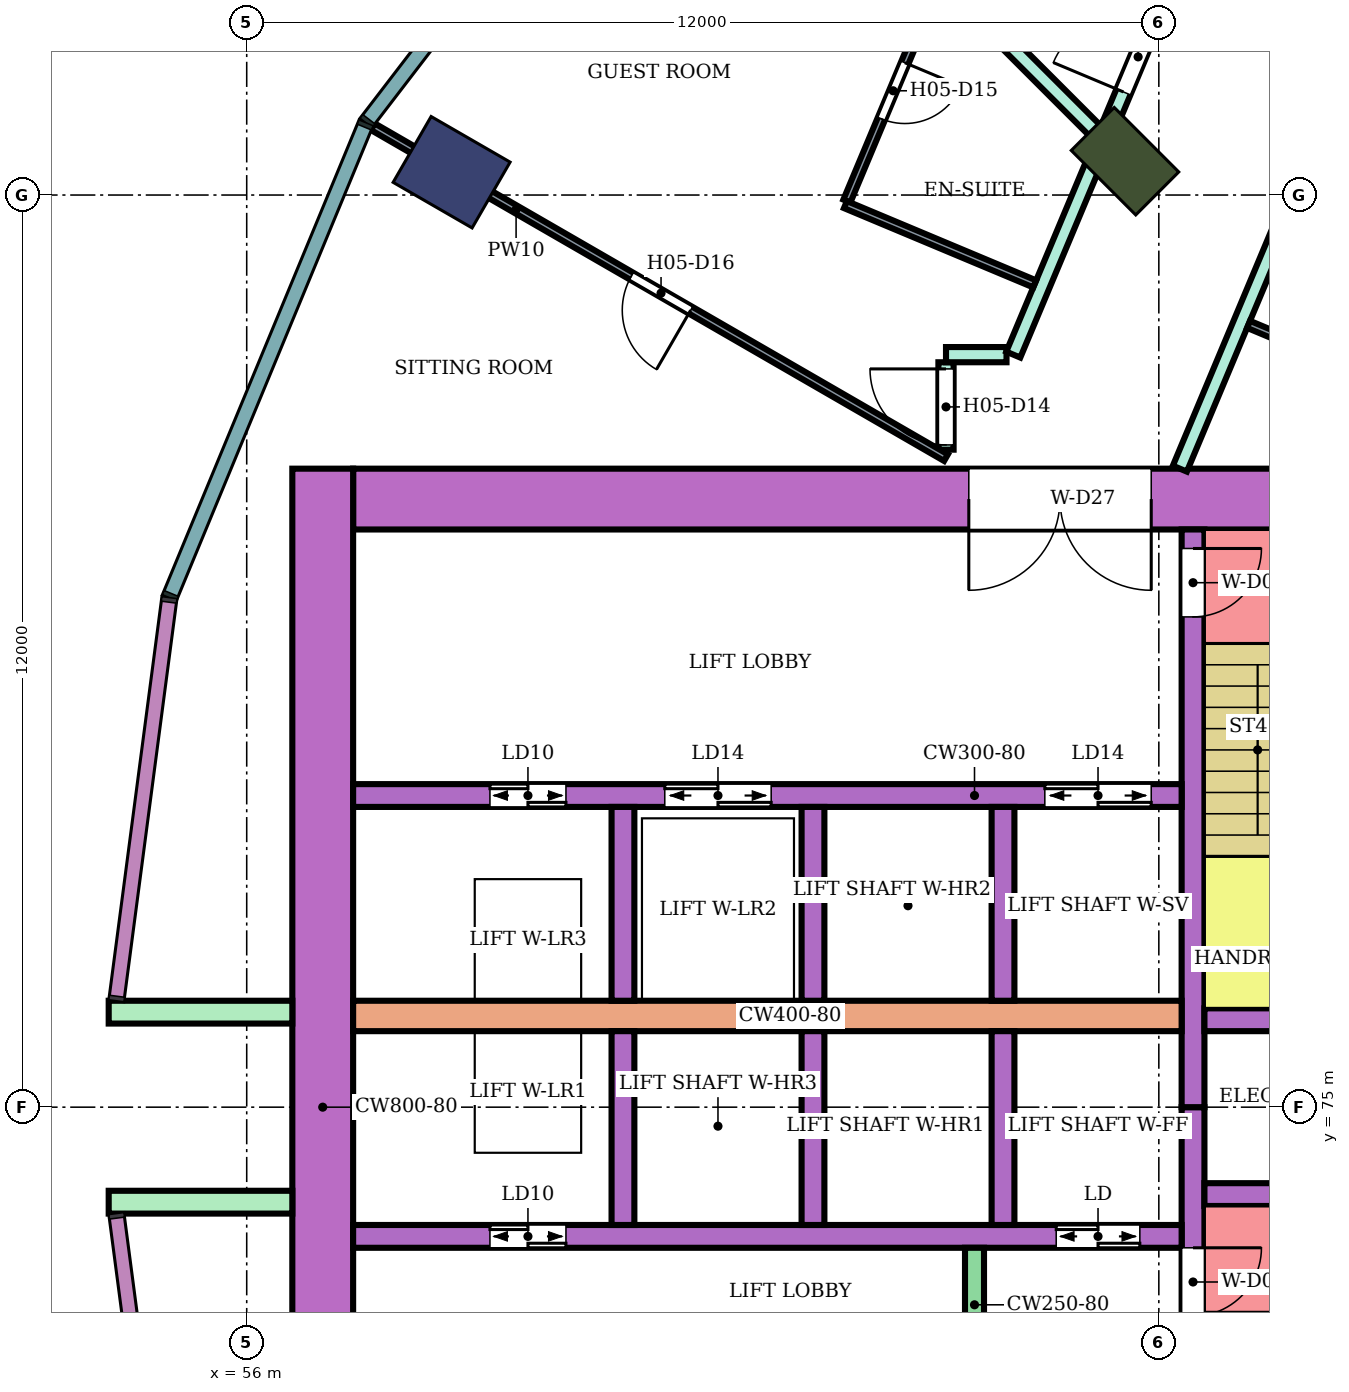
"""IFC4 building model, lengths in metres.
Left out: names, types, materials, properties, quantities, classifications, styles, units other than length and angle.
Written with IfcOpenShell. Run it as: python <this file> out.ifc"""

import sys

from ifc_helpers import new_model, si_unit, direction, frame, frame_2d, origin, origin_2d, place, context, subcontext, project, spatial, rectangle, extrude, element, fill, save


model = new_model("IFC4")
c1 = context("Model", 3, precision=1e-05, world=origin(), true_north=direction((0.0, 1.0)))
c2 = subcontext(c1, "Body", "Model", "MODEL_VIEW")
j1 = project(units=[si_unit("LENGTHUNIT", "METRE"), si_unit("PLANEANGLEUNIT", "RADIAN")], contexts=[c1])
p1 = place(None, origin())
s1 = spatial("IfcSite", under=j1, at=p1, CompositionType="ELEMENT")
p2 = place(p1, origin())
s2 = spatial("IfcBuilding", under=s1, at=p2, CompositionType="ELEMENT")
p3 = place(p2, frame((0.0, 0.0, 86.2)))
s3 = spatial("IfcBuildingStorey", under=s2, at=p3, CompositionType="ELEMENT", Elevation=86.2)
p4 = place(p3, frame((58.696, 87.3, 0.0), z_axis=(0.0, 0.0, 1.0), x_axis=(-0.866025403784, 0.5, 0.0)))
e1 = element("IfcColumn", 1, at=p4, inside=s3, PredefinedType="COLUMN", context=c2, shape_type="SweptSolid", body=[
    extrude(rectangle(XDim=1.2, YDim=1.0, at=origin_2d()), origin(), (0.0, 0.0, 1.0), 3.8),
])
p5 = place(p3, frame((67.555, 87.445, 0.0), z_axis=(0.0, 0.0, 1.0), x_axis=(-0.707106781187, 0.707106781187, 0.0)))
e2 = element("IfcColumn", 2, at=p5, inside=s3, PredefinedType="COLUMN", context=c2, shape_type="SweptSolid", body=[
    extrude(rectangle(XDim=1.2, YDim=0.8, at=origin_2d()), origin(), (0.0, 0.0, 1.0), 3.8),
])
p6 = place(p3, frame((72.1, 83.0, 0.0), z_axis=(0.0, 0.0, 1.0), x_axis=(-1.0, 0.0, 0.0)))
e3 = element("IfcWall", 3, at=p6, inside=s3, PredefinedType="SHEAR", context=c2, shape_type="SweptSolid", body=[
    extrude(rectangle(XDim=14.7, YDim=0.8, at=frame_2d((7.35, 0.0))), origin(), (0.0, 0.0, 1.0), 3.48),
])
p7 = place(p6, frame((4.2, 0.0, 0.0)))
e4 = element("IfcOpeningElement", 4, at=p7, cuts=e3, PredefinedType="OPENING", context=c2, shape_type="SweptSolid", body=[
    extrude(rectangle(XDim=2.4, YDim=2.4, at=frame_2d((1.2, 1.2))), frame((0.0, 0.41, 0.0), z_axis=(0.0, -1.0, 0.0), x_axis=(1.0, 0.0, 0.0)), (0.0, 0.0, 1.0), 0.82),
])
p8 = place(p3, frame((57.0, 83.4, 0.0), z_axis=(0.0, 0.0, 1.0), x_axis=(0.0, -1.0, 0.0)))
e5 = element("IfcWall", 5, at=p8, inside=s3, PredefinedType="SHEAR", context=c2, shape_type="SweptSolid", body=[
    extrude(rectangle(XDim=16.8, YDim=0.8, at=frame_2d((8.4, 0.0))), origin(), (0.0, 0.0, 1.0), 3.48),
])
p9 = place(p3, frame((68.45, 75.0, 0.0), z_axis=(0.0, 0.0, 1.0), x_axis=(0.0, -1.0, 0.0)))
e6 = element("IfcWall", 6, at=p9, inside=s3, PredefinedType="SHEAR", context=c2, shape_type="SweptSolid", body=[
    extrude(rectangle(XDim=7.6, YDim=0.3, at=frame_2d((3.8, 0.0))), origin(), (0.0, 0.0, 1.0), 3.48),
])
p10 = place(p9, frame((1.85, 0.0, 0.0)))
e7 = element("IfcOpeningElement", 7, at=p10, cuts=e6, PredefinedType="OPENING", context=c2, shape_type="SweptSolid", body=[
    extrude(rectangle(XDim=0.9, YDim=2.1, at=frame_2d((0.45, 1.05))), frame((0.0, 0.16, 0.0), z_axis=(0.0, -1.0, 0.0), x_axis=(1.0, 0.0, 0.0)), (0.0, 0.0, 1.0), 0.32),
])
p11 = place(p3, frame((68.45, 82.6, 0.0), z_axis=(0.0, 0.0, 1.0), x_axis=(0.0, -1.0, 0.0)))
e8 = element("IfcWall", 8, at=p11, inside=s3, PredefinedType="SHEAR", context=c2, shape_type="SweptSolid", body=[
    extrude(rectangle(XDim=7.6, YDim=0.3, at=frame_2d((3.8, 0.0))), origin(), (0.0, 0.0, 1.0), 3.48),
])
p12 = place(p11, frame((0.25, 0.0, 0.0)))
e9 = element("IfcOpeningElement", 9, at=p12, cuts=e8, PredefinedType="OPENING", context=c2, shape_type="SweptSolid", body=[
    extrude(rectangle(XDim=0.9, YDim=2.1, at=frame_2d((0.45, 1.05))), frame((0.0, 0.16, 0.0), z_axis=(0.0, -1.0, 0.0), x_axis=(1.0, 0.0, 0.0)), (0.0, 0.0, 1.0), 0.32),
])
p13 = place(p3, frame((71.65, 73.85, 0.0), z_axis=(0.0, 0.0, 1.0), x_axis=(-1.0, 0.0, 0.0)))
e10 = element("IfcWall", 10, at=p13, inside=s3, PredefinedType="SHEAR", context=c2, shape_type="SweptSolid", body=[
    extrude(rectangle(XDim=3.05, YDim=0.3, at=frame_2d((1.525, 0.0))), origin(), (0.0, 0.0, 1.0), 3.48),
])
p14 = place(p13, frame((1.1, 0.0, 0.0)))
e11 = element("IfcOpeningElement", 11, at=p14, cuts=e10, PredefinedType="OPENING", context=c2, shape_type="SweptSolid", body=[
    extrude(rectangle(XDim=0.7, YDim=2.0, at=frame_2d((0.35, 1.0))), frame((0.0, 0.16, 0.0), z_axis=(0.0, -1.0, 0.0), x_axis=(1.0, 0.0, 0.0)), (0.0, 0.0, 1.0), 0.32),
])
p15 = place(p3, frame((71.65, 76.15, 0.0), z_axis=(0.0, 0.0, 1.0), x_axis=(-1.0, 0.0, 0.0)))
e12 = element("IfcWall", 12, at=p15, inside=s3, PredefinedType="SHEAR", context=c2, shape_type="SweptSolid", body=[
    extrude(rectangle(XDim=3.05, YDim=0.3, at=frame_2d((1.525, 0.0))), origin(), (0.0, 0.0, 1.0), 3.48),
])
p16 = place(p3, frame((68.3, 73.3, 0.0), z_axis=(0.0, 0.0, 1.0), x_axis=(-1.0, 0.0, 0.0)))
e13 = element("IfcWall", 13, at=p16, inside=s3, PredefinedType="SHEAR", context=c2, shape_type="SweptSolid", body=[
    extrude(rectangle(XDim=10.9, YDim=0.3, at=frame_2d((5.45, 0.0))), origin(), (0.0, 0.0, 1.0), 3.48),
])
p17 = place(p16, frame((0.55, 0.0, 0.0)))
e14 = element("IfcOpeningElement", 14, at=p17, cuts=e13, PredefinedType="OPENING", context=c2, shape_type="SweptSolid", body=[
    extrude(rectangle(XDim=1.1, YDim=2.1, at=frame_2d((0.55, 1.05))), frame((0.0, 0.16, 0.0), z_axis=(0.0, -1.0, 0.0), x_axis=(1.0, 0.0, 0.0)), (0.0, 0.0, 1.0), 0.32),
])
p18 = place(p16, frame((8.1, 0.0, 0.0)))
e15 = element("IfcOpeningElement", 15, at=p18, cuts=e13, PredefinedType="OPENING", context=c2, shape_type="SweptSolid", body=[
    extrude(rectangle(XDim=1.0, YDim=2.1, at=frame_2d((0.5, 1.05))), frame((0.0, 0.16, 0.0), z_axis=(0.0, -1.0, 0.0), x_axis=(1.0, 0.0, 0.0)), (0.0, 0.0, 1.0), 0.32),
])
p19 = place(p3, frame((68.3, 76.2, 0.0), z_axis=(0.0, 0.0, 1.0), x_axis=(-1.0, 0.0, 0.0)))
e16 = element("IfcWall", 16, at=p19, inside=s3, PredefinedType="SHEAR", context=c2, shape_type="SweptSolid", body=[
    extrude(rectangle(XDim=10.9, YDim=0.4, at=frame_2d((5.45, 0.0))), origin(), (0.0, 0.0, 1.0), 3.48),
])
p20 = place(p3, frame((68.3, 79.1, 0.0), z_axis=(0.0, 0.0, 1.0), x_axis=(-1.0, 0.0, 0.0)))
e17 = element("IfcWall", 17, at=p20, inside=s3, PredefinedType="SHEAR", context=c2, shape_type="SweptSolid", body=[
    extrude(rectangle(XDim=10.9, YDim=0.3, at=frame_2d((5.45, 0.0))), origin(), (0.0, 0.0, 1.0), 3.48),
])
p21 = place(p20, frame((0.4, 0.0, 0.0)))
e18 = element("IfcOpeningElement", 18, at=p21, cuts=e17, PredefinedType="OPENING", context=c2, shape_type="SweptSolid", body=[
    extrude(rectangle(XDim=1.4, YDim=2.1, at=frame_2d((0.7, 1.05))), frame((0.0, 0.16, 0.0), z_axis=(0.0, -1.0, 0.0), x_axis=(1.0, 0.0, 0.0)), (0.0, 0.0, 1.0), 0.32),
])
p22 = place(p20, frame((5.4, 0.0, 0.0)))
e19 = element("IfcOpeningElement", 19, at=p22, cuts=e17, PredefinedType="OPENING", context=c2, shape_type="SweptSolid", body=[
    extrude(rectangle(XDim=1.4, YDim=2.1, at=frame_2d((0.7, 1.05))), frame((0.0, 0.16, 0.0), z_axis=(0.0, -1.0, 0.0), x_axis=(1.0, 0.0, 0.0)), (0.0, 0.0, 1.0), 0.32),
])
p23 = place(p20, frame((8.1, 0.0, 0.0)))
e20 = element("IfcOpeningElement", 20, at=p23, cuts=e17, PredefinedType="OPENING", context=c2, shape_type="SweptSolid", body=[
    extrude(rectangle(XDim=1.0, YDim=2.1, at=frame_2d((0.5, 1.05))), frame((0.0, 0.16, 0.0), z_axis=(0.0, -1.0, 0.0), x_axis=(1.0, 0.0, 0.0)), (0.0, 0.0, 1.0), 0.32),
])
for number, where, z_axis, x_axis in (
    (21, (65.95, 76.0, 0.0), (0.0, 0.0, 1.0), (0.0, -1.0, 0.0)),
    (22, (63.45, 76.0, 0.0), (0.0, 0.0, 1.0), (0.0, -1.0, 0.0)),
    (23, (60.95, 76.0, 0.0), (0.0, 0.0, 1.0), (0.0, -1.0, 0.0)),
    (24, (65.95, 78.95, 0.0), (0.0, 0.0, 1.0), (0.0, -1.0, 0.0)),
    (25, (63.45, 78.95, 0.0), (0.0, 0.0, 1.0), (0.0, -1.0, 0.0)),
    (26, (60.95, 78.95, 0.0), (0.0, 0.0, 1.0), (0.0, -1.0, 0.0)),
):
    element("IfcWall", number, at=place(p3, frame(where, z_axis=z_axis, x_axis=x_axis)), inside=s3, PredefinedType="SHEAR", context=c2, shape_type="SweptSolid", body=[
        extrude(rectangle(XDim=2.55, YDim=0.3, at=frame_2d((1.275, 0.0))), origin(), (0.0, 0.0, 1.0), 3.48),
    ])
p24 = place(p3, frame((65.575, 73.15, 0.0), z_axis=(0.0, 0.0, 1.0), x_axis=(0.0, -1.0, 0.0)))
e27 = element("IfcWall", 27, at=p24, inside=s3, PredefinedType="SHEAR", context=c2, shape_type="SweptSolid", body=[
    extrude(rectangle(XDim=1.5, YDim=0.25, at=frame_2d((0.75, 0.0))), origin(), (0.0, 0.0, 1.0), 3.48),
])
for number, where, z_axis, x_axis in (
    (28, (56.6, 76.25, 0.0), (0.0, 0.0, 1.0), (-1.0, 0.0, 0.0)),
    (29, (56.6, 73.75, 0.0), (0.0, 0.0, 1.0), (-1.0, 0.0, 0.0)),
):
    element("IfcWall", number, at=place(p3, frame(where, z_axis=z_axis, x_axis=x_axis)), inside=s3, PredefinedType="NOTDEFINED", context=c2, shape_type="SweptSolid", body=[
        extrude(rectangle(XDim=2.416, YDim=0.3, at=frame_2d((1.208, 0.0))), origin(), (0.0, 0.0, 1.0), 3.8),
    ])
p25 = place(p3, frame((63.6, 91.409, 0.0), z_axis=(0.0, 0.0, 1.0), x_axis=(0.70693749829, -0.707276023566, 0.0)))
e30 = element("IfcWall", 30, at=p25, inside=s3, PredefinedType="PARTITIONING", context=c2, shape_type="SweptSolid", body=[
    extrude(rectangle(XDim=5.048, YDim=0.2, at=frame_2d((2.524, 0.0))), origin(), (0.0, 0.0, 1.0), 3.35),
])
p26 = place(p3, frame((65.2, 83.65, 0.0), z_axis=(0.0, 0.0, 1.0), x_axis=(0.0, 1.0, 0.0)))
e31 = element("IfcWall", 31, at=p26, inside=s3, PredefinedType="PARTITIONING", context=c2, shape_type="SweptSolid", body=[
    extrude(rectangle(XDim=1.15, YDim=0.2, at=frame_2d((0.575, 0.0))), origin(), (0.0, 0.0, 1.0), 3.35),
])
p27 = place(p26, frame((0.062, 0.0, 0.0)))
e32 = element("IfcOpeningElement", 32, at=p27, cuts=e31, PredefinedType="OPENING", context=c2, shape_type="SweptSolid", body=[
    extrude(rectangle(XDim=1.0, YDim=2.1, at=frame_2d((0.5, 1.05))), frame((0.0, 0.11, 0.0), z_axis=(0.0, -1.0, 0.0), x_axis=(1.0, 0.0, 0.0)), (0.0, 0.0, 1.0), 0.22),
])
p28 = place(p3, frame((65.2, 84.9, 0.0), z_axis=(0.0, 0.0, 1.0), x_axis=(1.0, 0.0, 0.0)))
e33 = element("IfcWall", 33, at=p28, inside=s3, PredefinedType="PARTITIONING", context=c2, shape_type="SweptSolid", body=[
    extrude(rectangle(XDim=0.796, YDim=0.2, at=frame_2d((0.398, 0.0))), origin(), (0.0, 0.0, 1.0), 3.35),
])
p29 = place(p3, frame((66.085, 84.9, 0.0), z_axis=(0.0, 0.0, 1.0), x_axis=(0.386676248006, 0.922215527536, 0.0)))
e34 = element("IfcWall", 34, at=p29, inside=s3, PredefinedType="PARTITIONING", context=c2, shape_type="SweptSolid", body=[
    extrude(rectangle(XDim=8.5, YDim=0.2, at=frame_2d((4.25, 0.0))), origin(), (0.0, 0.0, 1.0), 3.35),
])
p30 = place(p29, frame((3.748, 0.0, 0.0)))
e35 = element("IfcOpeningElement", 35, at=p30, cuts=e34, PredefinedType="OPENING", context=c2, shape_type="SweptSolid", body=[
    extrude(rectangle(XDim=1.0, YDim=2.1, at=frame_2d((0.5, 1.05))), frame((0.0, 0.11, 0.0), z_axis=(0.0, -1.0, 0.0), x_axis=(1.0, 0.0, 0.0)), (0.0, 0.0, 1.0), 0.22),
])
p31 = place(p3, frame((68.277, 83.4, 0.0), z_axis=(0.0, 0.0, 1.0), x_axis=(0.386454861164, 0.922308321703, 0.0)))
e36 = element("IfcWall", 36, at=p31, inside=s3, PredefinedType="PARTITIONING", context=c2, shape_type="SweptSolid", body=[
    extrude(rectangle(XDim=7.762, YDim=0.2, at=frame_2d((3.881, 0.0))), origin(), (0.0, 0.0, 1.0), 3.35),
])
p32 = place(p31, frame((5.351, 0.0, 0.0)))
e37 = element("IfcOpeningElement", 37, at=p32, cuts=e36, PredefinedType="OPENING", context=c2, shape_type="SweptSolid", body=[
    extrude(rectangle(XDim=1.0, YDim=2.1, at=frame_2d((0.5, 1.05))), frame((0.0, 0.11, 0.0), z_axis=(0.0, -1.0, 0.0), x_axis=(1.0, 0.0, 0.0)), (0.0, 0.0, 1.0), 0.22),
])
p33 = place(p3, frame((57.659, 87.899, 0.0), z_axis=(0.0, 0.0, 1.0), x_axis=(0.86602264145, -0.500004784474, 0.0)))
e38 = element("IfcWall", 38, at=p33, inside=s3, PredefinedType="PARTITIONING", context=c2, shape_type="SweptSolid", body=[
    extrude(rectangle(XDim=8.708, YDim=0.1, at=frame_2d((4.354, 0.0))), origin(), (0.0, 0.0, 1.0), 3.35),
])
p34 = place(p33, frame((3.929, 0.0, 0.0)))
e39 = element("IfcOpeningElement", 39, at=p34, cuts=e38, PredefinedType="OPENING", context=c2, shape_type="SweptSolid", body=[
    extrude(rectangle(XDim=0.9, YDim=2.1, at=frame_2d((0.45, 1.05))), frame((0.0, 0.06, 0.0), z_axis=(0.0, -1.0, 0.0), x_axis=(1.0, 0.0, 0.0)), (0.0, 0.0, 1.0), 0.12),
])
p35 = place(p3, frame((63.896, 86.92, 0.0), z_axis=(0.0, 0.0, 1.0), x_axis=(0.386485049699, 0.922295671875, 0.0)))
e40 = element("IfcWall", 40, at=p35, inside=s3, PredefinedType="PARTITIONING", context=c2, shape_type="SweptSolid", body=[
    extrude(rectangle(XDim=3.077, YDim=0.1, at=frame_2d((1.539, 0.0))), origin(), (0.0, 0.0, 1.0), 3.35),
])
p36 = place(p35, frame((1.174, 0.0, 0.0)))
e41 = element("IfcOpeningElement", 41, at=p36, cuts=e40, PredefinedType="OPENING", context=c2, shape_type="SweptSolid", body=[
    extrude(rectangle(XDim=0.8, YDim=2.1, at=frame_2d((0.4, 1.05))), frame((0.0, 0.06, 0.0), z_axis=(0.0, -1.0, 0.0), x_axis=(1.0, 0.0, 0.0)), (0.0, 0.0, 1.0), 0.12),
])
p37 = place(p3, frame((63.877, 86.874, 0.0), z_axis=(0.0, 0.0, 1.0), x_axis=(0.922350337209, -0.386354572188, 0.0)))
e42 = element("IfcWall", 42, at=p37, inside=s3, PredefinedType="PARTITIONING", context=c2, shape_type="SweptSolid", body=[
    extrude(rectangle(XDim=2.7, YDim=0.1, at=frame_2d((1.35, 0.0))), origin(), (0.0, 0.0, 1.0), 3.35),
])
p38 = place(p3, frame((69.181, 85.298, 0.0), z_axis=(0.0, 0.0, 1.0), x_axis=(0.922377635784, -0.38628939541, 0.0)))
e43 = element("IfcWall", 43, at=p38, inside=s3, PredefinedType="PARTITIONING", context=c2, shape_type="SweptSolid", body=[
    extrude(rectangle(XDim=2.65, YDim=0.1, at=frame_2d((1.325, 0.0))), origin(), (0.0, 0.0, 1.0), 3.35),
])
p39 = place(p38, frame((0.9, 0.0, 0.0)))
e44 = element("IfcOpeningElement", 44, at=p39, cuts=e43, PredefinedType="OPENING", context=c2, shape_type="SweptSolid", body=[
    extrude(rectangle(XDim=0.8, YDim=2.1, at=frame_2d((0.4, 1.05))), frame((0.0, 0.06, 0.0), z_axis=(0.0, -1.0, 0.0), x_axis=(1.0, 0.0, 0.0)), (0.0, 0.0, 1.0), 0.12),
])
p40 = place(p30, origin())
e45 = element("IfcDoor", 45, at=p40, inside=s3, OperationType="SINGLE_SWING_LEFT", PredefinedType="DOOR", context=c2, shape_type="SweptSolid", body=[
    extrude(rectangle(XDim=1.0, YDim=2.1, at=frame_2d((0.5, 1.05))), frame((0.0, 0.025, 0.0), z_axis=(0.0, -1.0, 0.0), x_axis=(1.0, 0.0, 0.0)), (0.0, 0.0, 1.0), 0.05),
])
fill(e35, e45)
p41 = place(p27, origin())
e46 = element("IfcDoor", 46, at=p41, inside=s3, OperationType="SINGLE_SWING_RIGHT", PredefinedType="DOOR", context=c2, shape_type="SweptSolid", body=[
    extrude(rectangle(XDim=1.0, YDim=2.1, at=frame_2d((0.5, 1.05))), frame((0.0, 0.025, 0.0), z_axis=(0.0, -1.0, 0.0), x_axis=(1.0, 0.0, 0.0)), (0.0, 0.0, 1.0), 0.05),
])
fill(e32, e46)
p42 = place(p36, frame((0.8, 0.0, 0.0), z_axis=(0.0, 0.0, 1.0), x_axis=(-1.0, 0.0, 0.0)))
e47 = element("IfcDoor", 47, at=p42, inside=s3, OperationType="SINGLE_SWING_LEFT", PredefinedType="DOOR", context=c2, shape_type="SweptSolid", body=[
    extrude(rectangle(XDim=0.8, YDim=2.1, at=frame_2d((0.4, 1.05))), frame((0.0, 0.025, 0.0), z_axis=(0.0, -1.0, 0.0), x_axis=(1.0, 0.0, 0.0)), (0.0, 0.0, 1.0), 0.05),
])
fill(e41, e47)
p43 = place(p34, frame((0.9, 0.0, 0.0), z_axis=(0.0, 0.0, 1.0), x_axis=(-1.0, 0.0, 0.0)))
e48 = element("IfcDoor", 48, at=p43, inside=s3, OperationType="SINGLE_SWING_LEFT", PredefinedType="DOOR", context=c2, shape_type="SweptSolid", body=[
    extrude(rectangle(XDim=0.9, YDim=2.1, at=frame_2d((0.45, 1.05))), frame((0.0, 0.025, 0.0), z_axis=(0.0, -1.0, 0.0), x_axis=(1.0, 0.0, 0.0)), (0.0, 0.0, 1.0), 0.05),
])
fill(e39, e48)
p44 = place(p10, origin())
e49 = element("IfcDoor", 49, at=p44, inside=s3, OperationType="SINGLE_SWING_LEFT", PredefinedType="DOOR", context=c2, shape_type="SweptSolid", body=[
    extrude(rectangle(XDim=0.9, YDim=2.1, at=frame_2d((0.45, 1.05))), frame((0.0, 0.025, 0.0), z_axis=(0.0, -1.0, 0.0), x_axis=(1.0, 0.0, 0.0)), (0.0, 0.0, 1.0), 0.05),
])
fill(e7, e49)
p45 = place(p12, origin())
e50 = element("IfcDoor", 50, at=p45, inside=s3, OperationType="SINGLE_SWING_LEFT", PredefinedType="DOOR", context=c2, shape_type="SweptSolid", body=[
    extrude(rectangle(XDim=0.9, YDim=2.1, at=frame_2d((0.45, 1.05))), frame((0.0, 0.025, 0.0), z_axis=(0.0, -1.0, 0.0), x_axis=(1.0, 0.0, 0.0)), (0.0, 0.0, 1.0), 0.05),
])
fill(e9, e50)
p46 = place(p17, origin())
e51 = element("IfcDoor", 51, at=p46, inside=s3, OperationType="DOUBLE_DOOR_SLIDING", PredefinedType="DOOR", context=c2, shape_type="SweptSolid", body=[
    extrude(rectangle(XDim=1.1, YDim=2.1, at=frame_2d((0.55, 1.05))), frame((0.0, 0.025, 0.0), z_axis=(0.0, -1.0, 0.0), x_axis=(1.0, 0.0, 0.0)), (0.0, 0.0, 1.0), 0.05),
])
fill(e14, e51)
p47 = place(p18, origin())
e52 = element("IfcDoor", 52, at=p47, inside=s3, OperationType="DOUBLE_DOOR_SLIDING", PredefinedType="DOOR", context=c2, shape_type="SweptSolid", body=[
    extrude(rectangle(XDim=1.0, YDim=2.1, at=frame_2d((0.5, 1.05))), frame((0.0, 0.025, 0.0), z_axis=(0.0, -1.0, 0.0), x_axis=(1.0, 0.0, 0.0)), (0.0, 0.0, 1.0), 0.05),
])
fill(e15, e52)
p48 = place(p21, origin())
e53 = element("IfcDoor", 53, at=p48, inside=s3, OperationType="DOUBLE_DOOR_SLIDING", PredefinedType="DOOR", context=c2, shape_type="SweptSolid", body=[
    extrude(rectangle(XDim=1.4, YDim=2.1, at=frame_2d((0.7, 1.05))), frame((0.0, 0.025, 0.0), z_axis=(0.0, -1.0, 0.0), x_axis=(1.0, 0.0, 0.0)), (0.0, 0.0, 1.0), 0.05),
])
fill(e18, e53)
p49 = place(p22, origin())
e54 = element("IfcDoor", 54, at=p49, inside=s3, OperationType="DOUBLE_DOOR_SLIDING", PredefinedType="DOOR", context=c2, shape_type="SweptSolid", body=[
    extrude(rectangle(XDim=1.4, YDim=2.1, at=frame_2d((0.7, 1.05))), frame((0.0, 0.025, 0.0), z_axis=(0.0, -1.0, 0.0), x_axis=(1.0, 0.0, 0.0)), (0.0, 0.0, 1.0), 0.05),
])
fill(e19, e54)
p50 = place(p23, origin())
e55 = element("IfcDoor", 55, at=p50, inside=s3, OperationType="DOUBLE_DOOR_SLIDING", PredefinedType="DOOR", context=c2, shape_type="SweptSolid", body=[
    extrude(rectangle(XDim=1.0, YDim=2.1, at=frame_2d((0.5, 1.05))), frame((0.0, 0.025, 0.0), z_axis=(0.0, -1.0, 0.0), x_axis=(1.0, 0.0, 0.0)), (0.0, 0.0, 1.0), 0.05),
])
fill(e20, e55)
p51 = place(p7, origin())
e56 = element("IfcDoor", 56, at=p51, inside=s3, OperationType="DOUBLE_DOOR_SINGLE_SWING", PredefinedType="DOOR", context=c2, shape_type="SweptSolid", body=[
    extrude(rectangle(XDim=2.4, YDim=2.4, at=frame_2d((1.2, 1.2))), frame((0.0, 0.025, 0.0), z_axis=(0.0, -1.0, 0.0), x_axis=(1.0, 0.0, 0.0)), (0.0, 0.0, 1.0), 0.05),
])
fill(e4, e56)
save(model, sys.argv[1])
